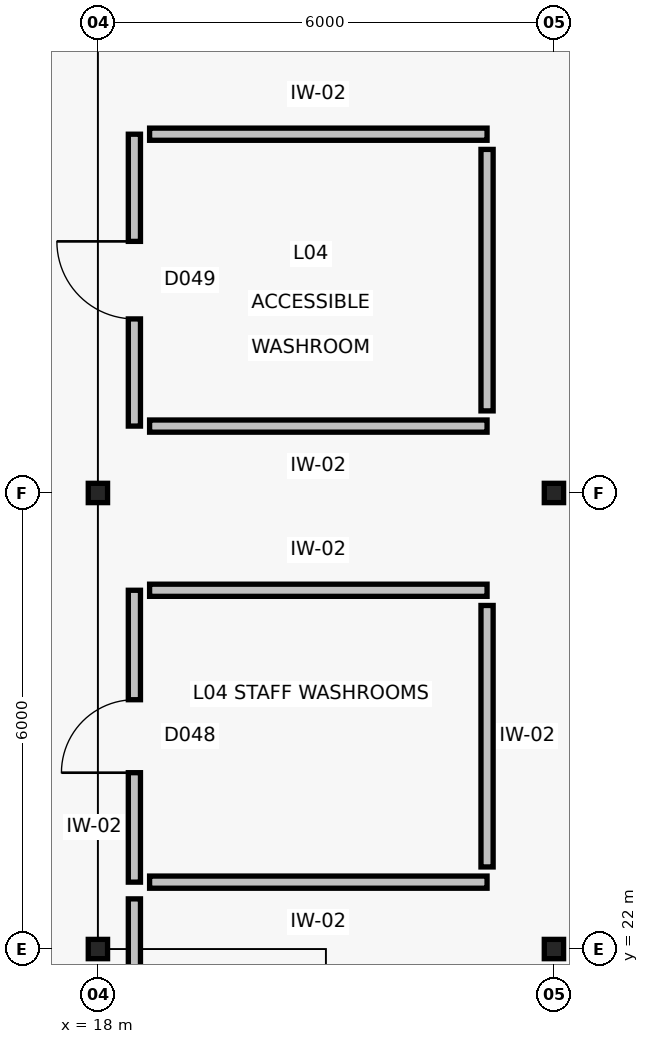
"""IFC4 building model, lengths in metres.
Left out: names, types, materials, properties, quantities, classifications, styles, units other than length and angle.
Written with IfcOpenShell. Run it as: python <this file> out.ifc"""

import sys

from ifc_helpers import new_model, si_unit, direction, frame, frame_2d, origin, origin_2d, place, context, subcontext, project, spatial, rectangle, hollow_rectangle, extrude, element, fill, save


model = new_model("IFC4")
c1 = context("Model", 3, precision=1e-05, world=origin(), true_north=direction((0.0, 1.0)))
c2 = subcontext(c1, "Body", "Model", "MODEL_VIEW")
j1 = project(units=[si_unit("LENGTHUNIT", "METRE"), si_unit("PLANEANGLEUNIT", "RADIAN")], contexts=[c1])
p1 = place(None, origin())
s1 = spatial("IfcSite", under=j1, at=p1, CompositionType="ELEMENT")
p2 = place(p1, origin())
s2 = spatial("IfcBuilding", under=s1, at=p2, CompositionType="ELEMENT")
p3 = place(p2, frame((0.0, 0.0, 15.4)))
s3 = spatial("IfcBuildingStorey", under=s2, at=p3, CompositionType="ELEMENT", Elevation=15.4)
for number, where, z_axis, x_axis in (
    (1, (18.0, 22.0, 0.0), (0.0, 0.0, 1.0), (1.0, 0.0, 0.0)),
    (2, (18.0, 28.0, 0.0), (0.0, 0.0, 1.0), (1.0, 0.0, 0.0)),
    (3, (24.0, 22.0, 0.0), (0.0, 0.0, 1.0), (1.0, 0.0, 0.0)),
    (4, (24.0, 28.0, 0.0), (0.0, 0.0, 1.0), (1.0, 0.0, 0.0)),
):
    element("IfcColumn", number, at=place(p3, frame(where, z_axis=z_axis, x_axis=x_axis)), inside=s3, PredefinedType="COLUMN", context=c2, shape_type="SweptSolid", body=[
        extrude(hollow_rectangle(XDim=0.254, YDim=0.254, WallThickness=0.01, InnerFilletRadius=0.01, OuterFilletRadius=0.019, at=origin_2d()), origin(), (0.0, 0.0, 1.0), 4.0),
    ])
p4 = place(p3, frame((18.48, 22.88, 0.0), z_axis=(0.0, 0.0, 1.0), x_axis=(0.0, 1.0, 0.0)))
e5 = element("IfcWall", 5, at=p4, inside=s3, PredefinedType="PARTITIONING", context=c2, shape_type="SweptSolid", body=[
    extrude(rectangle(XDim=3.84, YDim=0.16, at=frame_2d((1.92, 0.0))), origin(), (0.0, 0.0, 1.0), 3.68),
])
p5 = place(p4, frame((1.44, 0.0, 0.0)))
e6 = element("IfcOpeningElement", 6, at=p5, cuts=e5, PredefinedType="OPENING", context=c2, shape_type="SweptSolid", body=[
    extrude(rectangle(XDim=0.96, YDim=2.1, at=frame_2d((0.48, 1.05))), frame((0.0, 0.095, 0.0), z_axis=(0.0, -1.0, 0.0), x_axis=(1.0, 0.0, 0.0)), (0.0, 0.0, 1.0), 0.19),
])
for number, where, z_axis, x_axis in (
    (7, (18.68, 26.72, 0.0), (0.0, 0.0, 1.0), (1.0, 0.0, 0.0)),
    (8, (23.12, 22.88, 0.0), (0.0, 0.0, 1.0), (-1.0, 0.0, 0.0)),
):
    element("IfcWall", number, at=place(p3, frame(where, z_axis=z_axis, x_axis=x_axis)), inside=s3, PredefinedType="PARTITIONING", context=c2, shape_type="SweptSolid", body=[
        extrude(rectangle(XDim=4.44, YDim=0.16, at=frame_2d((2.22, 0.0))), origin(), (0.0, 0.0, 1.0), 3.292),
    ])
p6 = place(p3, frame((23.12, 26.52, 0.0), z_axis=(0.0, 0.0, 1.0), x_axis=(0.0, -1.0, 0.0)))
e9 = element("IfcWall", 9, at=p6, inside=s3, PredefinedType="PARTITIONING", context=c2, shape_type="SweptSolid", body=[
    extrude(rectangle(XDim=3.44, YDim=0.16, at=frame_2d((1.72, 0.0))), origin(), (0.0, 0.0, 1.0), 3.68),
])
p7 = place(p3, frame((18.48, 28.88, 0.0), z_axis=(0.0, 0.0, 1.0), x_axis=(0.0, 1.0, 0.0)))
e10 = element("IfcWall", 10, at=p7, inside=s3, PredefinedType="PARTITIONING", context=c2, shape_type="SweptSolid", body=[
    extrude(rectangle(XDim=3.84, YDim=0.16, at=frame_2d((1.92, 0.0))), origin(), (0.0, 0.0, 1.0), 3.68),
])
p8 = place(p7, frame((1.41, 0.0, 0.0)))
e11 = element("IfcOpeningElement", 11, at=p8, cuts=e10, PredefinedType="OPENING", context=c2, shape_type="SweptSolid", body=[
    extrude(rectangle(XDim=1.02, YDim=2.1, at=frame_2d((0.51, 1.05))), frame((0.0, 0.095, 0.0), z_axis=(0.0, -1.0, 0.0), x_axis=(1.0, 0.0, 0.0)), (0.0, 0.0, 1.0), 0.19),
])
for number, where, z_axis, x_axis in (
    (12, (18.68, 32.72, 0.0), (0.0, 0.0, 1.0), (1.0, 0.0, 0.0)),
    (13, (23.12, 28.88, 0.0), (0.0, 0.0, 1.0), (-1.0, 0.0, 0.0)),
):
    element("IfcWall", number, at=place(p3, frame(where, z_axis=z_axis, x_axis=x_axis)), inside=s3, PredefinedType="PARTITIONING", context=c2, shape_type="SweptSolid", body=[
        extrude(rectangle(XDim=4.44, YDim=0.16, at=frame_2d((2.22, 0.0))), origin(), (0.0, 0.0, 1.0), 3.447),
    ])
p9 = place(p3, frame((23.12, 32.52, 0.0), z_axis=(0.0, 0.0, 1.0), x_axis=(0.0, -1.0, 0.0)))
e14 = element("IfcWall", 14, at=p9, inside=s3, PredefinedType="PARTITIONING", context=c2, shape_type="SweptSolid", body=[
    extrude(rectangle(XDim=3.44, YDim=0.16, at=frame_2d((1.72, 0.0))), origin(), (0.0, 0.0, 1.0), 3.68),
])
p10 = place(p3, frame((18.48, 0.68, 0.0), z_axis=(0.0, 0.0, 1.0), x_axis=(0.0, 1.0, 0.0)))
e15 = element("IfcWall", 15, at=p10, inside=s3, PredefinedType="PARTITIONING", context=c2, shape_type="SweptSolid", body=[
    extrude(rectangle(XDim=21.98, YDim=0.16, at=frame_2d((10.99, 0.0))), origin(), (0.0, 0.0, 1.0), 3.111),
])
p11 = place(p10, frame((7.315, 0.0, 0.0)))
e16 = element("IfcOpeningElement", 16, at=p11, cuts=e15, PredefinedType="OPENING", context=c2, shape_type="SweptSolid", body=[
    extrude(rectangle(XDim=1.08, YDim=2.15, at=frame_2d((0.54, 1.075))), frame((0.0, 0.095, 0.0), z_axis=(0.0, -1.0, 0.0), x_axis=(1.0, 0.0, 0.0)), (0.0, 0.0, 1.0), 0.19),
])
p12 = place(p5, origin())
e17 = element("IfcDoor", 17, at=p12, inside=s3, OperationType="SINGLE_SWING_LEFT", PredefinedType="DOOR", context=c2, shape_type="SweptSolid", body=[
    extrude(rectangle(XDim=0.96, YDim=2.1, at=frame_2d((0.48, 1.05))), frame((0.0, 0.025, 0.0), z_axis=(0.0, -1.0, 0.0), x_axis=(1.0, 0.0, 0.0)), (0.0, 0.0, 1.0), 0.05),
])
fill(e6, e17)
p13 = place(p8, origin())
e18 = element("IfcDoor", 18, at=p13, inside=s3, OperationType="SINGLE_SWING_RIGHT", PredefinedType="DOOR", context=c2, shape_type="SweptSolid", body=[
    extrude(rectangle(XDim=1.02, YDim=2.1, at=frame_2d((0.51, 1.05))), frame((0.0, 0.025, 0.0), z_axis=(0.0, -1.0, 0.0), x_axis=(1.0, 0.0, 0.0)), (0.0, 0.0, 1.0), 0.05),
])
fill(e11, e18)
save(model, sys.argv[1])
